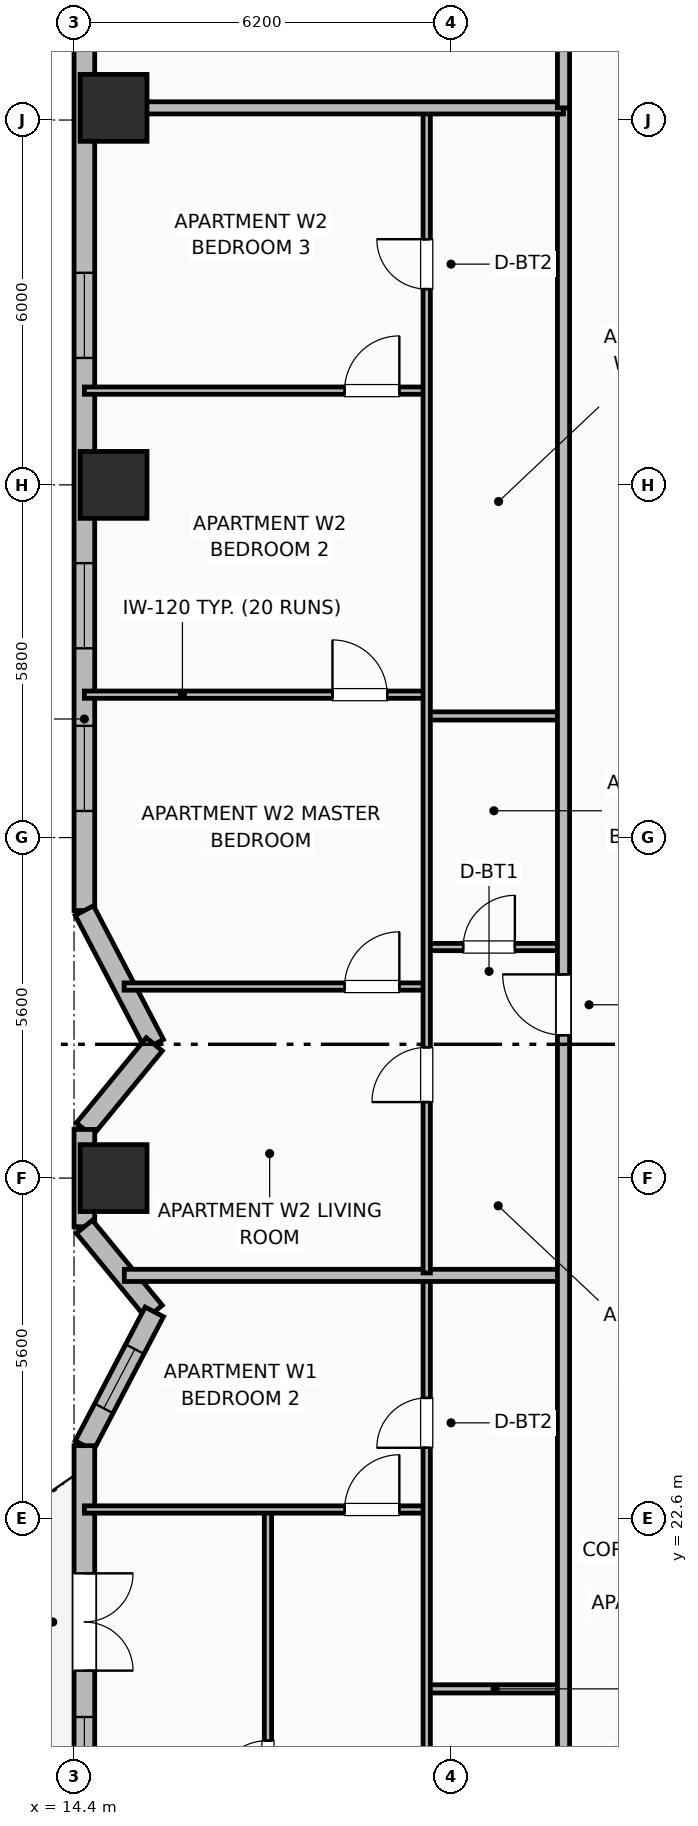
"""IFC4 building model, lengths in metres.
Left out: names, types, materials, properties, quantities, classifications, styles, units other than length and angle.
Written with IfcOpenShell. Run it as: python <this file> out.ifc"""

import sys

from ifc_helpers import new_model, si_unit, direction, frame, frame_2d, origin, origin_2d, place, context, subcontext, project, spatial, rectangle, extrude, element, fill, save


model = new_model("IFC4")
c1 = context("Model", 3, precision=1e-05, world=origin(), true_north=direction((0.0, 1.0)))
c2 = subcontext(c1, "Body", "Model", "MODEL_VIEW")
j1 = project(units=[si_unit("LENGTHUNIT", "METRE"), si_unit("PLANEANGLEUNIT", "RADIAN")], contexts=[c1])
p1 = place(None, origin())
s1 = spatial("IfcSite", under=j1, at=p1, CompositionType="ELEMENT")
p2 = place(p1, origin())
s2 = spatial("IfcBuilding", under=s1, at=p2, CompositionType="ELEMENT")
p3 = place(p2, frame((0.0, 0.0, 132.7)))
s3 = spatial("IfcBuildingStorey", under=s2, at=p3, CompositionType="ELEMENT", Elevation=132.7)
for number, where, z_axis, x_axis in (
    (1, (15.05, 28.2, 0.0), (0.0, 0.0, 1.0), (1.0, 0.0, 0.0)),
    (2, (15.05, 39.6, 0.0), (0.0, 0.0, 1.0), (1.0, 0.0, 0.0)),
    (3, (15.05, 45.8, 0.0), (0.0, 0.0, 1.0), (1.0, 0.0, 0.0)),
):
    element("IfcColumn", number, at=place(p3, frame(where, z_axis=z_axis, x_axis=x_axis)), inside=s3, PredefinedType="COLUMN", context=c2, shape_type="SweptSolid", body=[
        extrude(rectangle(XDim=1.1, YDim=1.1, at=origin_2d()), origin(), (0.0, 0.0, 1.0), 3.7),
    ])
p4 = place(p3, frame((14.57, 47.4, 0.0), z_axis=(0.0, 0.0, 1.0), x_axis=(0.0, -1.0, 0.0)))
e4 = element("IfcWall", 4, at=p4, inside=s3, PredefinedType="SOLIDWALL", context=c2, shape_type="SweptSolid", body=[
    extrude(rectangle(XDim=14.8, YDim=0.34, at=frame_2d((7.4, 0.0))), origin(), (0.0, 0.0, 1.0), 2.66),
])
p5 = place(p4, frame((4.312, 0.0, 0.69)))
e5 = element("IfcOpeningElement", 5, at=p5, cuts=e4, PredefinedType="OPENING", context=c2, shape_type="SweptSolid", body=[
    extrude(rectangle(XDim=1.4, YDim=1.85, at=frame_2d((0.7, 0.925))), frame((0.0, 0.18, 0.0), z_axis=(0.0, -1.0, 0.0), x_axis=(1.0, 0.0, 0.0)), (0.0, 0.0, 1.0), 0.36),
])
p6 = place(p4, frame((9.087, 0.0, 0.69)))
e6 = element("IfcOpeningElement", 6, at=p6, cuts=e4, PredefinedType="OPENING", context=c2, shape_type="SweptSolid", body=[
    extrude(rectangle(XDim=1.4, YDim=1.85, at=frame_2d((0.7, 0.925))), frame((0.0, 0.18, 0.0), z_axis=(0.0, -1.0, 0.0), x_axis=(1.0, 0.0, 0.0)), (0.0, 0.0, 1.0), 0.36),
])
p7 = place(p4, frame((11.762, 0.0, 0.69)))
e7 = element("IfcOpeningElement", 7, at=p7, cuts=e4, PredefinedType="OPENING", context=c2, shape_type="SweptSolid", body=[
    extrude(rectangle(XDim=1.4, YDim=1.85, at=frame_2d((0.7, 0.925))), frame((0.0, 0.18, 0.0), z_axis=(0.0, -1.0, 0.0), x_axis=(1.0, 0.0, 0.0)), (0.0, 0.0, 1.0), 0.36),
])
p8 = place(p3, frame((14.57, 32.6, 0.0), z_axis=(0.0, 0.0, 1.0), x_axis=(0.463191013929, -0.88625847506, 0.0)))
e8 = element("IfcWall", 8, at=p8, inside=s3, PredefinedType="SOLIDWALL", context=c2, shape_type="SweptSolid", body=[
    extrude(rectangle(XDim=2.483, YDim=0.34, at=frame_2d((1.241, 0.0))), origin(), (0.0, 0.0, 1.0), 2.66),
])
p9 = place(p3, frame((15.72, 30.4, 0.0), z_axis=(0.0, 0.0, 1.0), x_axis=(-0.634733675645, -0.772730975827, 0.0)))
e9 = element("IfcWall", 9, at=p9, inside=s3, PredefinedType="SOLIDWALL", context=c2, shape_type="SweptSolid", body=[
    extrude(rectangle(XDim=1.812, YDim=0.34, at=frame_2d((0.906, 0.0))), origin(), (0.0, 0.0, 1.0), 2.66),
])
p10 = place(p3, frame((14.57, 29.0, 0.0), z_axis=(0.0, 0.0, 1.0), x_axis=(0.0, -1.0, 0.0)))
e10 = element("IfcWall", 10, at=p10, inside=s3, PredefinedType="SOLIDWALL", context=c2, shape_type="SweptSolid", body=[
    extrude(rectangle(XDim=1.6, YDim=0.34, at=frame_2d((0.8, 0.0))), origin(), (0.0, 0.0, 1.0), 2.66),
])
p11 = place(p3, frame((14.57, 27.4, 0.0), z_axis=(0.0, 0.0, 1.0), x_axis=(0.634733675645, -0.772730975827, 0.0)))
e11 = element("IfcWall", 11, at=p11, inside=s3, PredefinedType="SOLIDWALL", context=c2, shape_type="SweptSolid", body=[
    extrude(rectangle(XDim=1.812, YDim=0.34, at=frame_2d((0.906, 0.0))), origin(), (0.0, 0.0, 1.0), 2.66),
])
p12 = place(p3, frame((15.72, 26.0, 0.0), z_axis=(0.0, 0.0, 1.0), x_axis=(-0.46323138706, -0.886237373418, 0.0)))
e12 = element("IfcWall", 12, at=p12, inside=s3, PredefinedType="SOLIDWALL", context=c2, shape_type="SweptSolid", body=[
    extrude(rectangle(XDim=2.482, YDim=0.34, at=frame_2d((1.241, 0.0))), origin(), (0.0, 0.0, 1.0), 2.66),
])
p13 = place(p12, frame((0.691, 0.0, 0.85)))
e13 = element("IfcOpeningElement", 13, at=p13, cuts=e12, PredefinedType="OPENING", context=c2, shape_type="SweptSolid", body=[
    extrude(rectangle(XDim=1.1, YDim=1.65, at=frame_2d((0.55, 0.825))), frame((0.0, 0.18, 0.0), z_axis=(0.0, -1.0, 0.0), x_axis=(1.0, 0.0, 0.0)), (0.0, 0.0, 1.0), 0.36),
])
p14 = place(p3, frame((14.57, 23.8, 0.0), z_axis=(0.0, 0.0, 1.0), x_axis=(0.0, -1.0, 0.0)))
e14 = element("IfcWall", 14, at=p14, inside=s3, PredefinedType="SOLIDWALL", context=c2, shape_type="SweptSolid", body=[
    extrude(rectangle(XDim=14.8, YDim=0.34, at=frame_2d((7.4, 0.0))), origin(), (0.0, 0.0, 1.0), 2.66),
])
p15 = place(p14, frame((2.1, 0.0, 0.0)))
e15 = element("IfcOpeningElement", 15, at=p15, cuts=e14, PredefinedType="OPENING", context=c2, shape_type="SweptSolid", body=[
    extrude(rectangle(XDim=1.6, YDim=2.1, at=frame_2d((0.8, 1.05))), frame((0.0, 0.18, 0.0), z_axis=(0.0, -1.0, 0.0), x_axis=(1.0, 0.0, 0.0)), (0.0, 0.0, 1.0), 0.36),
])
p16 = place(p14, frame((4.462, 0.0, 0.89)))
e16 = element("IfcOpeningElement", 16, at=p16, cuts=e14, PredefinedType="OPENING", context=c2, shape_type="SweptSolid", body=[
    extrude(rectangle(XDim=1.1, YDim=1.65, at=frame_2d((0.55, 0.825))), frame((0.0, 0.18, 0.0), z_axis=(0.0, -1.0, 0.0), x_axis=(1.0, 0.0, 0.0)), (0.0, 0.0, 1.0), 0.36),
])
p17 = place(p14, frame((9.238, 0.0, 0.89)))
e17 = element("IfcOpeningElement", 17, at=p17, cuts=e14, PredefinedType="OPENING", context=c2, shape_type="SweptSolid", body=[
    extrude(rectangle(XDim=1.1, YDim=1.65, at=frame_2d((0.55, 0.825))), frame((0.0, 0.18, 0.0), z_axis=(0.0, -1.0, 0.0), x_axis=(1.0, 0.0, 0.0)), (0.0, 0.0, 1.0), 0.36),
])
p18 = place(p14, frame((10.863, 0.0, 0.89)))
e18 = element("IfcOpeningElement", 18, at=p18, cuts=e14, PredefinedType="OPENING", context=c2, shape_type="SweptSolid", body=[
    extrude(rectangle(XDim=1.1, YDim=1.65, at=frame_2d((0.55, 0.825))), frame((0.0, 0.18, 0.0), z_axis=(0.0, -1.0, 0.0), x_axis=(1.0, 0.0, 0.0)), (0.0, 0.0, 1.0), 0.36),
])
p19 = place(p3, frame((20.2, 19.8, 0.0), z_axis=(0.0, 0.0, 1.0), x_axis=(1.0, 0.0, 0.0)))
e19 = element("IfcWall", 19, at=p19, inside=s3, PredefinedType="PARTITIONING", context=c2, shape_type="SweptSolid", body=[
    extrude(rectangle(XDim=2.25, YDim=0.135, at=frame_2d((1.125, 0.0))), origin(), (0.0, 0.0, 1.0), 2.49),
])
p20 = place(p3, frame((17.589, 15.19, 0.0), z_axis=(0.0, 0.0, 1.0), x_axis=(0.0, 1.0, 0.0)))
e20 = element("IfcWall", 20, at=p20, inside=s3, PredefinedType="PARTITIONING", context=c2, shape_type="SweptSolid", body=[
    extrude(rectangle(XDim=7.52, YDim=0.12, at=frame_2d((3.76, 0.0))), origin(), (0.0, 0.0, 1.0), 2.49),
])
p21 = place(p20, frame((2.86, 0.0, 0.0)))
e21 = element("IfcOpeningElement", 21, at=p21, cuts=e20, PredefinedType="OPENING", context=c2, shape_type="SweptSolid", body=[
    extrude(rectangle(XDim=0.9, YDim=2.1, at=frame_2d((0.45, 1.05))), frame((0.0, 0.07, 0.0), z_axis=(0.0, -1.0, 0.0), x_axis=(1.0, 0.0, 0.0)), (0.0, 0.0, 1.0), 0.14),
])
p22 = place(p3, frame((14.57, 22.75, 0.0), z_axis=(0.0, 0.0, 1.0), x_axis=(1.0, 0.0, 0.0)))
e22 = element("IfcWall", 22, at=p22, inside=s3, PredefinedType="PARTITIONING", context=c2, shape_type="SweptSolid", body=[
    extrude(rectangle(XDim=5.63, YDim=0.12, at=frame_2d((2.815, 0.0))), origin(), (0.0, 0.0, 1.0), 2.49),
])
p23 = place(p22, frame((4.28, 0.0, 0.0)))
e23 = element("IfcOpeningElement", 23, at=p23, cuts=e22, PredefinedType="OPENING", context=c2, shape_type="SweptSolid", body=[
    extrude(rectangle(XDim=0.9, YDim=2.1, at=frame_2d((0.45, 1.05))), frame((0.0, 0.07, 0.0), z_axis=(0.0, -1.0, 0.0), x_axis=(1.0, 0.0, 0.0)), (0.0, 0.0, 1.0), 0.14),
])
p24 = place(p3, frame((20.2, 10.64, 0.0), z_axis=(0.0, 0.0, 1.0), x_axis=(0.0, 1.0, 0.0)))
e24 = element("IfcWall", 24, at=p24, inside=s3, PredefinedType="PARTITIONING", context=c2, shape_type="SweptSolid", body=[
    extrude(rectangle(XDim=15.92, YDim=0.12, at=frame_2d((7.96, 0.0))), origin(), (0.0, 0.0, 1.0), 2.49),
])
p25 = place(p24, frame((0.41, 0.0, 0.0)))
e25 = element("IfcOpeningElement", 25, at=p25, cuts=e24, PredefinedType="OPENING", context=c2, shape_type="SweptSolid", body=[
    extrude(rectangle(XDim=0.9, YDim=2.1, at=frame_2d((0.45, 1.05))), frame((0.0, 0.07, 0.0), z_axis=(0.0, -1.0, 0.0), x_axis=(1.0, 0.0, 0.0)), (0.0, 0.0, 1.0), 0.14),
])
p26 = place(p24, frame((13.125, 0.0, 0.0)))
e26 = element("IfcOpeningElement", 26, at=p26, cuts=e24, PredefinedType="OPENING", context=c2, shape_type="SweptSolid", body=[
    extrude(rectangle(XDim=0.82, YDim=2.08, at=frame_2d((0.41, 1.04))), frame((0.0, 0.07, 0.0), z_axis=(0.0, -1.0, 0.0), x_axis=(1.0, 0.0, 0.0)), (0.0, 0.0, 1.0), 0.14),
])
p27 = place(p3, frame((15.227, 26.6, 0.0), z_axis=(0.0, 0.0, 1.0), x_axis=(1.0, 0.0, 0.0)))
e27 = element("IfcWall", 27, at=p27, inside=s3, PredefinedType="PARTITIONING", context=c2, shape_type="SweptSolid", body=[
    extrude(rectangle(XDim=7.223, YDim=0.2, at=frame_2d((3.611, 0.0))), origin(), (0.0, 0.0, 1.0), 2.49),
])
p28 = place(p3, frame((20.2, 32.0, 0.0), z_axis=(0.0, 0.0, 1.0), x_axis=(1.0, 0.0, 0.0)))
e28 = element("IfcWall", 28, at=p28, inside=s3, PredefinedType="PARTITIONING", context=c2, shape_type="SweptSolid", body=[
    extrude(rectangle(XDim=2.25, YDim=0.12, at=frame_2d((1.125, 0.0))), origin(), (0.0, 0.0, 1.0), 2.49),
])
p29 = place(p28, frame((0.6, 0.0, 0.0)))
e29 = element("IfcOpeningElement", 29, at=p29, cuts=e28, PredefinedType="OPENING", context=c2, shape_type="SweptSolid", body=[
    extrude(rectangle(XDim=0.85, YDim=2.1, at=frame_2d((0.425, 1.05))), frame((0.0, 0.07, 0.0), z_axis=(0.0, -1.0, 0.0), x_axis=(1.0, 0.0, 0.0)), (0.0, 0.0, 1.0), 0.14),
])
p30 = place(p3, frame((20.2, 35.8, 0.0), z_axis=(0.0, 0.0, 1.0), x_axis=(1.0, 0.0, 0.0)))
e30 = element("IfcWall", 30, at=p30, inside=s3, PredefinedType="PARTITIONING", context=c2, shape_type="SweptSolid", body=[
    extrude(rectangle(XDim=2.25, YDim=0.135, at=frame_2d((1.125, 0.0))), origin(), (0.0, 0.0, 1.0), 2.49),
])
p31 = place(p3, frame((15.223, 31.35, 0.0), z_axis=(0.0, 0.0, 1.0), x_axis=(1.0, 0.0, 0.0)))
e31 = element("IfcWall", 31, at=p31, inside=s3, PredefinedType="PARTITIONING", context=c2, shape_type="SweptSolid", body=[
    extrude(rectangle(XDim=4.977, YDim=0.12, at=frame_2d((2.488, 0.0))), origin(), (0.0, 0.0, 1.0), 2.49),
])
p32 = place(p31, frame((3.627, 0.0, 0.0)))
e32 = element("IfcOpeningElement", 32, at=p32, cuts=e31, PredefinedType="OPENING", context=c2, shape_type="SweptSolid", body=[
    extrude(rectangle(XDim=0.9, YDim=2.1, at=frame_2d((0.45, 1.05))), frame((0.0, 0.07, 0.0), z_axis=(0.0, -1.0, 0.0), x_axis=(1.0, 0.0, 0.0)), (0.0, 0.0, 1.0), 0.14),
])
p33 = place(p3, frame((14.57, 36.15, 0.0), z_axis=(0.0, 0.0, 1.0), x_axis=(1.0, 0.0, 0.0)))
e33 = element("IfcWall", 33, at=p33, inside=s3, PredefinedType="PARTITIONING", context=c2, shape_type="SweptSolid", body=[
    extrude(rectangle(XDim=5.63, YDim=0.12, at=frame_2d((2.815, 0.0))), origin(), (0.0, 0.0, 1.0), 2.49),
])
p34 = place(p33, frame((4.08, 0.0, 0.0)))
e34 = element("IfcOpeningElement", 34, at=p34, cuts=e33, PredefinedType="OPENING", context=c2, shape_type="SweptSolid", body=[
    extrude(rectangle(XDim=0.9, YDim=2.1, at=frame_2d((0.45, 1.05))), frame((0.0, 0.07, 0.0), z_axis=(0.0, -1.0, 0.0), x_axis=(1.0, 0.0, 0.0)), (0.0, 0.0, 1.0), 0.14),
])
p35 = place(p3, frame((14.57, 41.15, 0.0), z_axis=(0.0, 0.0, 1.0), x_axis=(1.0, 0.0, 0.0)))
e35 = element("IfcWall", 35, at=p35, inside=s3, PredefinedType="PARTITIONING", context=c2, shape_type="SweptSolid", body=[
    extrude(rectangle(XDim=5.63, YDim=0.12, at=frame_2d((2.815, 0.0))), origin(), (0.0, 0.0, 1.0), 2.49),
])
p36 = place(p35, frame((4.28, 0.0, 0.0)))
e36 = element("IfcOpeningElement", 36, at=p36, cuts=e35, PredefinedType="OPENING", context=c2, shape_type="SweptSolid", body=[
    extrude(rectangle(XDim=0.9, YDim=2.1, at=frame_2d((0.45, 1.05))), frame((0.0, 0.07, 0.0), z_axis=(0.0, -1.0, 0.0), x_axis=(1.0, 0.0, 0.0)), (0.0, 0.0, 1.0), 0.14),
])
p37 = place(p3, frame((20.2, 26.64, 0.0), z_axis=(0.0, 0.0, 1.0), x_axis=(0.0, 1.0, 0.0)))
e37 = element("IfcWall", 37, at=p37, inside=s3, PredefinedType="PARTITIONING", context=c2, shape_type="SweptSolid", body=[
    extrude(rectangle(XDim=19.12, YDim=0.12, at=frame_2d((9.56, 0.0))), origin(), (0.0, 0.0, 1.0), 2.49),
])
p38 = place(p37, frame((2.81, 0.0, 0.0)))
e38 = element("IfcOpeningElement", 38, at=p38, cuts=e37, PredefinedType="OPENING", context=c2, shape_type="SweptSolid", body=[
    extrude(rectangle(XDim=0.9, YDim=2.1, at=frame_2d((0.45, 1.05))), frame((0.0, 0.07, 0.0), z_axis=(0.0, -1.0, 0.0), x_axis=(1.0, 0.0, 0.0)), (0.0, 0.0, 1.0), 0.14),
])
p39 = place(p37, frame((16.18, 0.0, 0.0)))
e39 = element("IfcOpeningElement", 39, at=p39, cuts=e37, PredefinedType="OPENING", context=c2, shape_type="SweptSolid", body=[
    extrude(rectangle(XDim=0.82, YDim=2.08, at=frame_2d((0.41, 1.04))), frame((0.0, 0.07, 0.0), z_axis=(0.0, -1.0, 0.0), x_axis=(1.0, 0.0, 0.0)), (0.0, 0.0, 1.0), 0.14),
])
p40 = place(p3, frame((22.45, 10.6, 0.0), z_axis=(0.0, 0.0, 1.0), x_axis=(0.0, 1.0, 0.0)))
e40 = element("IfcWall", 40, at=p40, inside=s3, PredefinedType="PARTITIONING", context=c2, shape_type="SweptSolid", body=[
    extrude(rectangle(XDim=35.2, YDim=0.2, at=frame_2d((17.6, 0.0))), origin(), (0.0, 0.0, 1.0), 2.49),
])
p41 = place(p40, frame((2.65, 0.0, 0.0)))
e41 = element("IfcOpeningElement", 41, at=p41, cuts=e40, PredefinedType="OPENING", context=c2, shape_type="SweptSolid", body=[
    extrude(rectangle(XDim=1.0, YDim=2.15, at=frame_2d((0.5, 1.075))), frame((0.0, 0.11, 0.0), z_axis=(0.0, -1.0, 0.0), x_axis=(1.0, 0.0, 0.0)), (0.0, 0.0, 1.0), 0.22),
])
p42 = place(p40, frame((19.95, 0.0, 0.0)))
e42 = element("IfcOpeningElement", 42, at=p42, cuts=e40, PredefinedType="OPENING", context=c2, shape_type="SweptSolid", body=[
    extrude(rectangle(XDim=1.0, YDim=2.15, at=frame_2d((0.5, 1.075))), frame((0.0, 0.11, 0.0), z_axis=(0.0, -1.0, 0.0), x_axis=(1.0, 0.0, 0.0)), (0.0, 0.0, 1.0), 0.22),
])
p43 = place(p3, frame((14.99, 45.8, 0.0), z_axis=(0.0, 0.0, 1.0), x_axis=(1.0, 0.0, 0.0)))
e43 = element("IfcWall", 43, at=p43, inside=s3, PredefinedType="PARTITIONING", context=c2, shape_type="SweptSolid", body=[
    extrude(rectangle(XDim=7.46, YDim=0.2, at=frame_2d((3.73, 0.0))), origin(), (0.0, 0.0, 1.0), 2.49),
])
p44 = place(p3, frame((22.45, 45.8, 0.0), z_axis=(0.0, 0.0, 1.0), x_axis=(0.0, 1.0, 0.0)))
e44 = element("IfcWall", 44, at=p44, inside=s3, PredefinedType="PARTITIONING", context=c2, shape_type="SweptSolid", body=[
    extrude(rectangle(XDim=5.63, YDim=0.2, at=frame_2d((2.815, 0.0))), origin(), (0.0, 0.0, 1.0), 2.49),
])
p45 = place(p5, origin())
e45 = element("IfcWindow", 45, at=p45, inside=s3, PartitioningType="SINGLE_PANEL", PredefinedType="WINDOW", context=c2, shape_type="SweptSolid", body=[
    extrude(rectangle(XDim=1.4, YDim=1.85, at=frame_2d((0.7, 0.925))), frame((0.0, 0.03, 0.0), z_axis=(0.0, -1.0, 0.0), x_axis=(1.0, 0.0, 0.0)), (0.0, 0.0, 1.0), 0.06),
])
fill(e5, e45)
p46 = place(p6, origin())
e46 = element("IfcWindow", 46, at=p46, inside=s3, PartitioningType="SINGLE_PANEL", PredefinedType="WINDOW", context=c2, shape_type="SweptSolid", body=[
    extrude(rectangle(XDim=1.4, YDim=1.85, at=frame_2d((0.7, 0.925))), frame((0.0, 0.03, 0.0), z_axis=(0.0, -1.0, 0.0), x_axis=(1.0, 0.0, 0.0)), (0.0, 0.0, 1.0), 0.06),
])
fill(e6, e46)
p47 = place(p7, origin())
e47 = element("IfcWindow", 47, at=p47, inside=s3, PartitioningType="SINGLE_PANEL", PredefinedType="WINDOW", context=c2, shape_type="SweptSolid", body=[
    extrude(rectangle(XDim=1.4, YDim=1.85, at=frame_2d((0.7, 0.925))), frame((0.0, 0.03, 0.0), z_axis=(0.0, -1.0, 0.0), x_axis=(1.0, 0.0, 0.0)), (0.0, 0.0, 1.0), 0.06),
])
fill(e7, e47)
p48 = place(p13, origin())
e48 = element("IfcWindow", 48, at=p48, inside=s3, PartitioningType="SINGLE_PANEL", PredefinedType="WINDOW", context=c2, shape_type="SweptSolid", body=[
    extrude(rectangle(XDim=1.1, YDim=1.65, at=frame_2d((0.55, 0.825))), frame((0.0, 0.03, 0.0), z_axis=(0.0, -1.0, 0.0), x_axis=(1.0, 0.0, 0.0)), (0.0, 0.0, 1.0), 0.06),
])
fill(e13, e48)
p49 = place(p15, origin())
e49 = element("IfcDoor", 49, at=p49, inside=s3, OperationType="DOUBLE_DOOR_SINGLE_SWING", PredefinedType="DOOR", context=c2, shape_type="SweptSolid", body=[
    extrude(rectangle(XDim=1.6, YDim=2.1, at=frame_2d((0.8, 1.05))), frame((0.0, 0.025, 0.0), z_axis=(0.0, -1.0, 0.0), x_axis=(1.0, 0.0, 0.0)), (0.0, 0.0, 1.0), 0.05),
])
fill(e15, e49)
p50 = place(p16, origin())
e50 = element("IfcWindow", 50, at=p50, inside=s3, PartitioningType="SINGLE_PANEL", PredefinedType="WINDOW", context=c2, shape_type="SweptSolid", body=[
    extrude(rectangle(XDim=1.1, YDim=1.65, at=frame_2d((0.55, 0.825))), frame((0.0, 0.03, 0.0), z_axis=(0.0, -1.0, 0.0), x_axis=(1.0, 0.0, 0.0)), (0.0, 0.0, 1.0), 0.06),
])
fill(e16, e50)
p51 = place(p21, origin())
e51 = element("IfcDoor", 51, at=p51, inside=s3, OperationType="SINGLE_SWING_LEFT", PredefinedType="DOOR", context=c2, shape_type="SweptSolid", body=[
    extrude(rectangle(XDim=0.9, YDim=2.1, at=frame_2d((0.45, 1.05))), frame((0.0, 0.025, 0.0), z_axis=(0.0, -1.0, 0.0), x_axis=(1.0, 0.0, 0.0)), (0.0, 0.0, 1.0), 0.05),
])
fill(e21, e51)
p52 = place(p23, origin())
e52 = element("IfcDoor", 52, at=p52, inside=s3, OperationType="SINGLE_SWING_RIGHT", PredefinedType="DOOR", context=c2, shape_type="SweptSolid", body=[
    extrude(rectangle(XDim=0.9, YDim=2.1, at=frame_2d((0.45, 1.05))), frame((0.0, 0.025, 0.0), z_axis=(0.0, -1.0, 0.0), x_axis=(1.0, 0.0, 0.0)), (0.0, 0.0, 1.0), 0.05),
])
fill(e23, e52)
p53 = place(p26, origin())
e53 = element("IfcDoor", 53, at=p53, inside=s3, OperationType="SINGLE_SWING_LEFT", PredefinedType="DOOR", context=c2, shape_type="SweptSolid", body=[
    extrude(rectangle(XDim=0.82, YDim=2.08, at=frame_2d((0.41, 1.04))), frame((0.0, 0.025, 0.0), z_axis=(0.0, -1.0, 0.0), x_axis=(1.0, 0.0, 0.0)), (0.0, 0.0, 1.0), 0.05),
])
fill(e26, e53)
p54 = place(p29, origin())
e54 = element("IfcDoor", 54, at=p54, inside=s3, OperationType="SINGLE_SWING_RIGHT", PredefinedType="DOOR", context=c2, shape_type="SweptSolid", body=[
    extrude(rectangle(XDim=0.85, YDim=2.1, at=frame_2d((0.425, 1.05))), frame((0.0, 0.025, 0.0), z_axis=(0.0, -1.0, 0.0), x_axis=(1.0, 0.0, 0.0)), (0.0, 0.0, 1.0), 0.05),
])
fill(e29, e54)
p55 = place(p32, origin())
e55 = element("IfcDoor", 55, at=p55, inside=s3, OperationType="SINGLE_SWING_RIGHT", PredefinedType="DOOR", context=c2, shape_type="SweptSolid", body=[
    extrude(rectangle(XDim=0.9, YDim=2.1, at=frame_2d((0.45, 1.05))), frame((0.0, 0.025, 0.0), z_axis=(0.0, -1.0, 0.0), x_axis=(1.0, 0.0, 0.0)), (0.0, 0.0, 1.0), 0.05),
])
fill(e32, e55)
p56 = place(p34, origin())
e56 = element("IfcDoor", 56, at=p56, inside=s3, OperationType="SINGLE_SWING_LEFT", PredefinedType="DOOR", context=c2, shape_type="SweptSolid", body=[
    extrude(rectangle(XDim=0.9, YDim=2.1, at=frame_2d((0.45, 1.05))), frame((0.0, 0.025, 0.0), z_axis=(0.0, -1.0, 0.0), x_axis=(1.0, 0.0, 0.0)), (0.0, 0.0, 1.0), 0.05),
])
fill(e34, e56)
p57 = place(p36, origin())
e57 = element("IfcDoor", 57, at=p57, inside=s3, OperationType="SINGLE_SWING_RIGHT", PredefinedType="DOOR", context=c2, shape_type="SweptSolid", body=[
    extrude(rectangle(XDim=0.9, YDim=2.1, at=frame_2d((0.45, 1.05))), frame((0.0, 0.025, 0.0), z_axis=(0.0, -1.0, 0.0), x_axis=(1.0, 0.0, 0.0)), (0.0, 0.0, 1.0), 0.05),
])
fill(e36, e57)
p58 = place(p38, origin())
e58 = element("IfcDoor", 58, at=p58, inside=s3, OperationType="SINGLE_SWING_LEFT", PredefinedType="DOOR", context=c2, shape_type="SweptSolid", body=[
    extrude(rectangle(XDim=0.9, YDim=2.1, at=frame_2d((0.45, 1.05))), frame((0.0, 0.025, 0.0), z_axis=(0.0, -1.0, 0.0), x_axis=(1.0, 0.0, 0.0)), (0.0, 0.0, 1.0), 0.05),
])
fill(e38, e58)
p59 = place(p39, origin())
e59 = element("IfcDoor", 59, at=p59, inside=s3, OperationType="SINGLE_SWING_RIGHT", PredefinedType="DOOR", context=c2, shape_type="SweptSolid", body=[
    extrude(rectangle(XDim=0.82, YDim=2.08, at=frame_2d((0.41, 1.04))), frame((0.0, 0.025, 0.0), z_axis=(0.0, -1.0, 0.0), x_axis=(1.0, 0.0, 0.0)), (0.0, 0.0, 1.0), 0.05),
])
fill(e39, e59)
p60 = place(p42, origin())
e60 = element("IfcDoor", 60, at=p60, inside=s3, OperationType="SINGLE_SWING_RIGHT", PredefinedType="DOOR", context=c2, shape_type="SweptSolid", body=[
    extrude(rectangle(XDim=1.0, YDim=2.15, at=frame_2d((0.5, 1.075))), frame((0.0, 0.025, 0.0), z_axis=(0.0, -1.0, 0.0), x_axis=(1.0, 0.0, 0.0)), (0.0, 0.0, 1.0), 0.05),
])
fill(e42, e60)
save(model, sys.argv[1])
